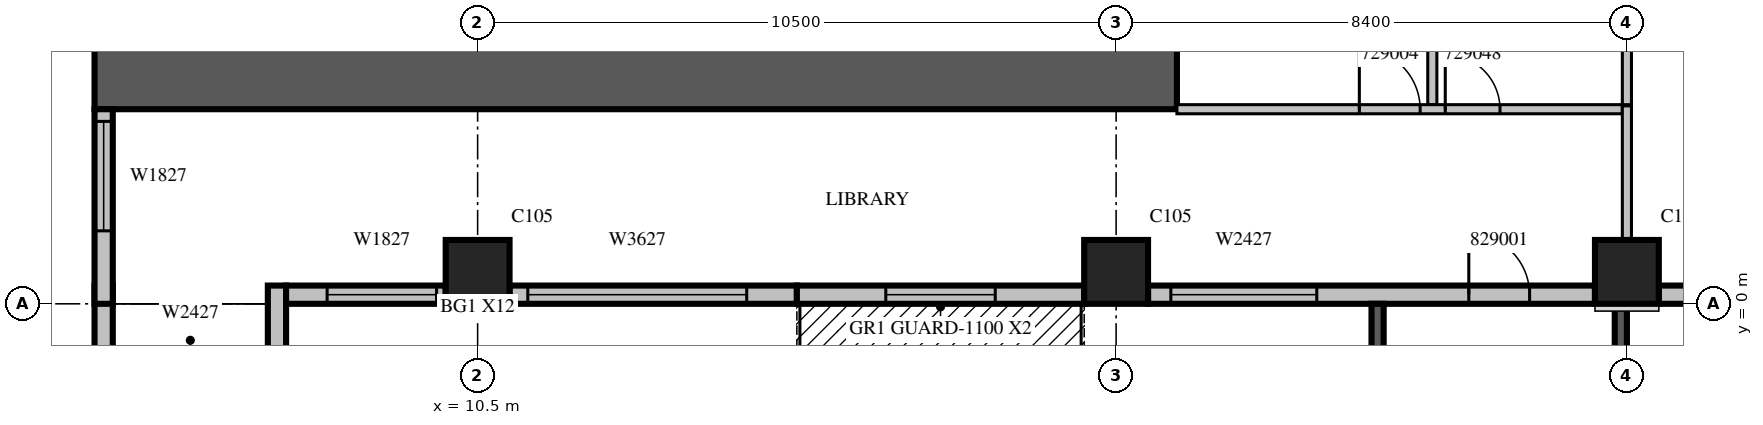
"""IFC4 building model, lengths in metres.
Left out: names, types, materials, properties, quantities, classifications, styles, units other than length and angle.
Written with IfcOpenShell. Run it as: python <this file> out.ifc"""

import sys

from ifc_helpers import new_model, si_unit, direction, frame, frame_2d, origin, origin_2d, place, context, subcontext, project, spatial, rectangle, extrude, source, transform, mapped, element, fill, save


model = new_model("IFC4")
c1 = context("Model", 3, precision=1e-05, world=origin(), true_north=direction((0.0, 1.0)))
c2 = subcontext(c1, "Body", "Model", "MODEL_VIEW")
j1 = project(units=[si_unit("LENGTHUNIT", "METRE"), si_unit("PLANEANGLEUNIT", "RADIAN")], contexts=[c1])
p1 = place(None, origin())
s1 = spatial("IfcSite", under=j1, at=p1, CompositionType="ELEMENT")
p2 = place(p1, origin())
s2 = spatial("IfcBuilding", under=s1, at=p2, CompositionType="ELEMENT")
p3 = place(p2, frame((0.0, 0.0, 132.9)))
s3 = spatial("IfcBuildingStorey", under=s2, at=p3, CompositionType="ELEMENT", Elevation=132.9)
m1 = source(origin(), c2, "Body", "SweptSolid", [
    extrude(rectangle(XDim=1.05, YDim=1.05, at=origin_2d()), origin(), (0.0, 0.0, 1.0), 4.2),
])
for number, where, z_axis, x_axis in (
    (1, (10.5, 0.525, 0.0), (0.0, 0.0, 1.0), (1.0, 0.0, 0.0)),
    (2, (21.0, 0.525, 0.0), (0.0, 0.0, 1.0), (1.0, 0.0, 0.0)),
    (3, (29.4, 0.525, 0.0), (0.0, 0.0, 1.0), (1.0, 0.0, 0.0)),
):
    element("IfcColumn", number, at=place(p3, frame(where, z_axis=z_axis, x_axis=x_axis)), inside=s3, PredefinedType="COLUMN", context=c2, shape_type="MappedRepresentation", body=[
        mapped(m1, transform((0.0, 0.0, 0.0), scale=1.0)),
    ])
m2 = source(origin(), c2, "Body", "SweptSolid", [
    extrude(rectangle(XDim=17.8, YDim=1.0, at=frame_2d((8.9, 0.0))), origin(), (0.0, 0.0, 1.0), 4.2),
])
p4 = place(p3, frame((4.2, 3.7, 0.0), z_axis=(0.0, 0.0, 1.0), x_axis=(1.0, 0.0, 0.0)))
e4 = element("IfcWall", 4, at=p4, inside=s3, PredefinedType="SHEAR", context=c2, shape_type="MappedRepresentation", body=[
    mapped(m2, transform((0.0, 0.0, 0.0), scale=1.0)),
])
m3 = source(origin(), c2, "Body", "SweptSolid", [
    extrude(rectangle(XDim=1.2, YDim=0.3, at=frame_2d((0.6, 0.0))), origin(), (0.0, 0.0, 1.0), 3.8),
])
for number, where, z_axis, x_axis in (
    (5, (4.35, 0.3, 0.0), (0.0, 0.0, 1.0), (0.0, -1.0, 0.0)),
    (6, (7.2, 0.3, 0.0), (0.0, 0.0, 1.0), (0.0, -1.0, 0.0)),
):
    element("IfcWall", number, at=place(p3, frame(where, z_axis=z_axis, x_axis=x_axis)), inside=s3, PredefinedType="STANDARD", context=c2, shape_type="MappedRepresentation", body=[
        mapped(m3, transform((0.0, 0.0, 0.0), scale=1.0)),
    ])
m4 = source(origin(), c2, "Body", "SweptSolid", [
    extrude(rectangle(XDim=2.625, YDim=0.3, at=frame_2d((1.312, 0.0))), origin(), (0.0, 0.0, 1.0), 3.8),
])
p5 = place(p3, frame((7.35, 0.15, 0.0), z_axis=(0.0, 0.0, 1.0), x_axis=(1.0, 0.0, 0.0)))
e7 = element("IfcWall", 7, at=p5, inside=s3, PredefinedType="STANDARD", context=c2, shape_type="MappedRepresentation", body=[
    mapped(m4, transform((0.0, 0.0, 0.0), scale=1.0)),
])
m5 = source(origin(), c2, "Body", "SweptSolid", [
    extrude(rectangle(XDim=1.8, YDim=2.7, at=frame_2d((0.9, 1.35))), frame((0.0, 0.16, 0.0), z_axis=(0.0, -1.0, 0.0), x_axis=(1.0, 0.0, 0.0)), (0.0, 0.0, 1.0), 0.32),
])
p6 = place(p5, frame((0.675, 0.0, 0.6)))
e8 = element("IfcOpeningElement", 8, at=p6, cuts=e7, PredefinedType="OPENING", context=c2, shape_type="MappedRepresentation", body=[
    mapped(m5, transform((0.0, 0.0, 0.0), scale=1.0)),
])
m6 = source(origin(), c2, "Body", "SweptSolid", [
    extrude(rectangle(XDim=4.725, YDim=0.3, at=frame_2d((2.362, 0.0))), origin(), (0.0, 0.0, 1.0), 3.8),
])
p7 = place(p3, frame((11.025, 0.15, 0.0), z_axis=(0.0, 0.0, 1.0), x_axis=(1.0, 0.0, 0.0)))
e9 = element("IfcWall", 9, at=p7, inside=s3, PredefinedType="STANDARD", context=c2, shape_type="MappedRepresentation", body=[
    mapped(m6, transform((0.0, 0.0, 0.0), scale=1.0)),
])
m7 = source(origin(), c2, "Body", "SweptSolid", [
    extrude(rectangle(XDim=3.6, YDim=2.7, at=frame_2d((1.8, 1.35))), frame((0.0, 0.16, 0.0), z_axis=(0.0, -1.0, 0.0), x_axis=(1.0, 0.0, 0.0)), (0.0, 0.0, 1.0), 0.32),
])
p8 = place(p7, frame((0.3, 0.0, 0.6)))
e10 = element("IfcOpeningElement", 10, at=p8, cuts=e9, PredefinedType="OPENING", context=c2, shape_type="MappedRepresentation", body=[
    mapped(m7, transform((0.0, 0.0, 0.0), scale=1.0)),
])
p9 = place(p3, frame((15.75, 0.15, 0.0), z_axis=(0.0, 0.0, 1.0), x_axis=(1.0, 0.0, 0.0)))
e11 = element("IfcWall", 11, at=p9, inside=s3, PredefinedType="STANDARD", context=c2, shape_type="MappedRepresentation", body=[
    mapped(m6, transform((0.0, 0.0, 0.0), scale=1.0)),
])
m8 = source(origin(), c2, "Body", "SweptSolid", [
    extrude(rectangle(XDim=1.8, YDim=2.4, at=frame_2d((0.9, 1.2))), frame((0.0, 0.16, 0.0), z_axis=(0.0, -1.0, 0.0), x_axis=(1.0, 0.0, 0.0)), (0.0, 0.0, 1.0), 0.32),
])
p10 = place(p9, frame((1.462, 0.0, 0.0)))
e12 = element("IfcOpeningElement", 12, at=p10, cuts=e11, PredefinedType="OPENING", context=c2, shape_type="MappedRepresentation", body=[
    mapped(m8, transform((0.0, 0.0, 0.0), scale=1.0)),
])
m9 = source(origin(), c2, "Body", "SweptSolid", [
    extrude(rectangle(XDim=7.35, YDim=0.3, at=frame_2d((3.675, 0.0))), origin(), (0.0, 0.0, 1.0), 3.8),
])
p11 = place(p3, frame((21.525, 0.15, 0.0), z_axis=(0.0, 0.0, 1.0), x_axis=(1.0, 0.0, 0.0)))
e13 = element("IfcWall", 13, at=p11, inside=s3, PredefinedType="STANDARD", context=c2, shape_type="MappedRepresentation", body=[
    mapped(m9, transform((0.0, 0.0, 0.0), scale=1.0)),
])
m10 = source(origin(), c2, "Body", "SweptSolid", [
    extrude(rectangle(XDim=2.4, YDim=2.7, at=frame_2d((1.2, 1.35))), frame((0.0, 0.16, 0.0), z_axis=(0.0, -1.0, 0.0), x_axis=(1.0, 0.0, 0.0)), (0.0, 0.0, 1.0), 0.32),
])
p12 = place(p11, frame((0.375, 0.0, 0.6)))
e14 = element("IfcOpeningElement", 14, at=p12, cuts=e13, PredefinedType="OPENING", context=c2, shape_type="MappedRepresentation", body=[
    mapped(m10, transform((0.0, 0.0, 0.0), scale=1.0)),
])
m11 = source(origin(), c2, "Body", "SweptSolid", [
    extrude(rectangle(XDim=1.0, YDim=2.1, at=frame_2d((0.5, 1.05))), frame((0.0, 0.16, 0.0), z_axis=(0.0, -1.0, 0.0), x_axis=(1.0, 0.0, 0.0)), (0.0, 0.0, 1.0), 0.32),
])
p13 = place(p11, frame((5.275, 0.0, 0.0)))
e15 = element("IfcOpeningElement", 15, at=p13, cuts=e13, PredefinedType="OPENING", context=c2, shape_type="MappedRepresentation", body=[
    mapped(m11, transform((0.0, 0.0, 0.0), scale=1.0)),
])
p14 = place(p3, frame((29.925, 0.15, 0.0), z_axis=(0.0, 0.0, 1.0), x_axis=(1.0, 0.0, 0.0)))
e16 = element("IfcWall", 16, at=p14, inside=s3, PredefinedType="STANDARD", context=c2, shape_type="MappedRepresentation", body=[
    mapped(m9, transform((0.0, 0.0, 0.0), scale=1.0)),
])
p15 = place(p14, frame((2.575, 0.0, 0.6)))
e17 = element("IfcOpeningElement", 17, at=p15, cuts=e16, PredefinedType="OPENING", context=c2, shape_type="MappedRepresentation", body=[
    mapped(m10, transform((0.0, 0.0, 0.0), scale=1.0)),
])
m12 = source(origin(), c2, "Body", "SweptSolid", [
    extrude(rectangle(XDim=3.2, YDim=0.3, at=frame_2d((1.6, 0.0))), origin(), (0.0, 0.0, 1.0), 3.8),
])
p16 = place(p3, frame((4.35, 3.2, 0.0), z_axis=(0.0, 0.0, 1.0), x_axis=(0.0, -1.0, 0.0)))
e18 = element("IfcWall", 18, at=p16, inside=s3, PredefinedType="STANDARD", context=c2, shape_type="MappedRepresentation", body=[
    mapped(m12, transform((0.0, 0.0, 0.0), scale=1.0)),
])
p17 = place(p16, frame((0.2, 0.0, 0.6)))
e19 = element("IfcOpeningElement", 19, at=p17, cuts=e18, PredefinedType="OPENING", context=c2, shape_type="MappedRepresentation", body=[
    mapped(m5, transform((0.0, 0.0, 0.0), scale=1.0)),
])
m13 = source(origin(), c2, "Body", "SweptSolid", [
    extrude(rectangle(XDim=3.9, YDim=0.2, at=frame_2d((1.95, 0.0))), origin(), (0.0, 0.0, 1.0), 3.79),
])
p18 = place(p3, frame((25.3, 0.0, 0.0), z_axis=(0.0, 0.0, 1.0), x_axis=(0.0, -1.0, 0.0)))
e20 = element("IfcWall", 20, at=p18, inside=s3, PredefinedType="SOLIDWALL", context=c2, shape_type="MappedRepresentation", body=[
    mapped(m13, transform((0.0, 0.0, 0.0), scale=1.0)),
])
m14 = source(origin(), c2, "Body", "SweptSolid", [
    extrude(rectangle(XDim=2.4, YDim=2.7, at=frame_2d((1.2, 1.35))), frame((0.0, 0.11, 0.0), z_axis=(0.0, -1.0, 0.0), x_axis=(1.0, 0.0, 0.0)), (0.0, 0.0, 1.0), 0.22),
])
p19 = place(p18, frame((0.75, 0.0, 0.6)))
e21 = element("IfcOpeningElement", 21, at=p19, cuts=e20, PredefinedType="OPENING", context=c2, shape_type="MappedRepresentation", body=[
    mapped(m14, transform((0.0, 0.0, 0.0), scale=1.0)),
])
p20 = place(p3, frame((29.3, 0.0, 0.0), z_axis=(0.0, 0.0, 1.0), x_axis=(0.0, -1.0, 0.0)))
e22 = element("IfcWall", 22, at=p20, inside=s3, PredefinedType="SOLIDWALL", context=c2, shape_type="MappedRepresentation", body=[
    mapped(m13, transform((0.0, 0.0, 0.0), scale=1.0)),
])
p21 = place(p20, frame((0.75, 0.0, 0.6)))
e23 = element("IfcOpeningElement", 23, at=p21, cuts=e22, PredefinedType="OPENING", context=c2, shape_type="MappedRepresentation", body=[
    mapped(m14, transform((0.0, 0.0, 0.0), scale=1.0)),
])
m15 = source(origin(), c2, "Body", "SweptSolid", [
    extrude(rectangle(XDim=11.425, YDim=0.15, at=frame_2d((5.713, 0.0))), origin(), (0.0, 0.0, 1.0), 3.8),
])
p22 = place(p3, frame((26.2, 14.7, 0.0), z_axis=(0.0, 0.0, 1.0), x_axis=(0.0, -1.0, 0.0)))
e24 = element("IfcWall", 24, at=p22, inside=s3, PredefinedType="PARTITIONING", context=c2, shape_type="MappedRepresentation", body=[
    mapped(m15, transform((0.0, 0.0, 0.0), scale=1.0)),
])
m16 = source(origin(), c2, "Body", "SweptSolid", [
    extrude(rectangle(XDim=0.9, YDim=2.1, at=frame_2d((0.45, 1.05))), frame((0.0, 0.085, 0.0), z_axis=(0.0, -1.0, 0.0), x_axis=(1.0, 0.0, 0.0)), (0.0, 0.0, 1.0), 0.17),
])
p23 = place(p22, frame((7.362, 0.0, 0.0)))
e25 = element("IfcOpeningElement", 25, at=p23, cuts=e24, PredefinedType="OPENING", context=c2, shape_type="MappedRepresentation", body=[
    mapped(m16, transform((0.0, 0.0, 0.0), scale=1.0)),
])
p24 = place(p22, frame((0.775, 0.0, 0.0)))
e26 = element("IfcOpeningElement", 26, at=p24, cuts=e24, PredefinedType="OPENING", context=c2, shape_type="MappedRepresentation", body=[
    mapped(m16, transform((0.0, 0.0, 0.0), scale=1.0)),
])
m17 = source(origin(), c2, "Body", "SweptSolid", [
    extrude(rectangle(XDim=6.701, YDim=0.15, at=frame_2d((3.35, 0.0))), origin(), (0.0, 0.0, 1.0), 3.8),
])
p25 = place(p3, frame((29.4, 3.275, 0.0), z_axis=(0.0, 0.0, 1.0), x_axis=(0.0, 1.0, 0.0)))
e27 = element("IfcWall", 27, at=p25, inside=s3, PredefinedType="PARTITIONING", context=c2, shape_type="MappedRepresentation", body=[
    mapped(m17, transform((0.0, 0.0, 0.0), scale=1.0)),
])
m18 = source(origin(), c2, "Body", "SweptSolid", [
    extrude(rectangle(XDim=7.325, YDim=0.15, at=frame_2d((3.663, 0.0))), origin(), (0.0, 0.0, 1.0), 3.8),
])
p26 = place(p3, frame((22.0, 3.2, 0.0), z_axis=(0.0, 0.0, 1.0), x_axis=(1.0, 0.0, 0.0)))
e28 = element("IfcWall", 28, at=p26, inside=s3, PredefinedType="PARTITIONING", context=c2, shape_type="MappedRepresentation", body=[
    mapped(m18, transform((0.0, 0.0, 0.0), scale=1.0)),
])
m19 = source(origin(), c2, "Body", "SweptSolid", [
    extrude(rectangle(XDim=1.0, YDim=2.1, at=frame_2d((0.5, 1.05))), frame((0.0, 0.085, 0.0), z_axis=(0.0, -1.0, 0.0), x_axis=(1.0, 0.0, 0.0)), (0.0, 0.0, 1.0), 0.17),
])
p27 = place(p26, frame((3.0, 0.0, 0.0)))
e29 = element("IfcOpeningElement", 29, at=p27, cuts=e28, PredefinedType="OPENING", context=c2, shape_type="MappedRepresentation", body=[
    mapped(m19, transform((0.0, 0.0, 0.0), scale=1.0)),
])
p28 = place(p26, frame((4.413, 0.0, 0.0)))
e30 = element("IfcOpeningElement", 30, at=p28, cuts=e28, PredefinedType="OPENING", context=c2, shape_type="MappedRepresentation", body=[
    mapped(m16, transform((0.0, 0.0, 0.0), scale=1.0)),
])
m20 = source(origin(), c2, "Body", "SweptSolid", [
    extrude(rectangle(XDim=2.206, YDim=0.15, at=frame_2d((1.103, 0.0))), origin(), (0.0, 0.0, 1.0), 3.8),
])
p29 = place(p3, frame((29.4, 1.049, 0.0), z_axis=(0.0, 0.0, 1.0), x_axis=(0.0, 1.0, 0.0)))
e31 = element("IfcWall", 31, at=p29, inside=s3, PredefinedType="PARTITIONING", context=c2, shape_type="MappedRepresentation", body=[
    mapped(m20, transform((0.0, 0.0, 0.0), scale=1.0)),
])
m21 = source(origin(), c2, "Body", "SweptSolid", [
    extrude(rectangle(XDim=1.8, YDim=2.7, at=frame_2d((0.9, 1.35))), frame((0.0, 0.03, 0.0), z_axis=(0.0, -1.0, 0.0), x_axis=(1.0, 0.0, 0.0)), (0.0, 0.0, 1.0), 0.06),
])
p30 = place(p6, origin())
e32 = element("IfcWindow", 32, at=p30, inside=s3, PartitioningType="SINGLE_PANEL", PredefinedType="WINDOW", context=c2, shape_type="MappedRepresentation", body=[
    mapped(m21, transform((0.0, 0.0, 0.0), scale=1.0)),
])
fill(e8, e32)
m22 = source(origin(), c2, "Body", "SweptSolid", [
    extrude(rectangle(XDim=3.6, YDim=2.7, at=frame_2d((1.8, 1.35))), frame((0.0, 0.03, 0.0), z_axis=(0.0, -1.0, 0.0), x_axis=(1.0, 0.0, 0.0)), (0.0, 0.0, 1.0), 0.06),
])
p31 = place(p8, origin())
e33 = element("IfcWindow", 33, at=p31, inside=s3, PartitioningType="SINGLE_PANEL", PredefinedType="WINDOW", context=c2, shape_type="MappedRepresentation", body=[
    mapped(m22, transform((0.0, 0.0, 0.0), scale=1.0)),
])
fill(e10, e33)
m23 = source(origin(), c2, "Body", "SweptSolid", [
    extrude(rectangle(XDim=1.8, YDim=2.4, at=frame_2d((0.9, 1.2))), frame((0.0, 0.025, 0.0), z_axis=(0.0, -1.0, 0.0), x_axis=(1.0, 0.0, 0.0)), (0.0, 0.0, 1.0), 0.05),
])
p32 = place(p10, origin())
e34 = element("IfcDoor", 34, at=p32, inside=s3, OperationType="SLIDING_TO_LEFT", PredefinedType="DOOR", context=c2, shape_type="MappedRepresentation", body=[
    mapped(m23, transform((0.0, 0.0, 0.0), scale=1.0)),
])
fill(e12, e34)
m24 = source(origin(), c2, "Body", "SweptSolid", [
    extrude(rectangle(XDim=2.4, YDim=2.7, at=frame_2d((1.2, 1.35))), frame((0.0, 0.03, 0.0), z_axis=(0.0, -1.0, 0.0), x_axis=(1.0, 0.0, 0.0)), (0.0, 0.0, 1.0), 0.06),
])
p33 = place(p12, origin())
e35 = element("IfcWindow", 35, at=p33, inside=s3, PartitioningType="SINGLE_PANEL", PredefinedType="WINDOW", context=c2, shape_type="MappedRepresentation", body=[
    mapped(m24, transform((0.0, 0.0, 0.0), scale=1.0)),
])
fill(e14, e35)
p34 = place(p17, origin())
e36 = element("IfcWindow", 36, at=p34, inside=s3, PartitioningType="SINGLE_PANEL", PredefinedType="WINDOW", context=c2, shape_type="MappedRepresentation", body=[
    mapped(m21, transform((0.0, 0.0, 0.0), scale=1.0)),
])
fill(e19, e36)
m25 = source(origin(), c2, "Body", "SweptSolid", [
    extrude(rectangle(XDim=1.0, YDim=2.1, at=frame_2d((0.5, 1.05))), frame((0.0, 0.025, 0.0), z_axis=(0.0, -1.0, 0.0), x_axis=(1.0, 0.0, 0.0)), (0.0, 0.0, 1.0), 0.05),
])
p35 = place(p27, origin())
e37 = element("IfcDoor", 37, at=p35, inside=s3, OperationType="SINGLE_SWING_LEFT", PredefinedType="DOOR", context=c2, shape_type="MappedRepresentation", body=[
    mapped(m25, transform((0.0, 0.0, 0.0), scale=1.0)),
])
fill(e29, e37)
m26 = source(origin(), c2, "Body", "SweptSolid", [
    extrude(rectangle(XDim=0.9, YDim=2.1, at=frame_2d((0.45, 1.05))), frame((0.0, 0.025, 0.0), z_axis=(0.0, -1.0, 0.0), x_axis=(1.0, 0.0, 0.0)), (0.0, 0.0, 1.0), 0.05),
])
p36 = place(p28, origin())
e38 = element("IfcDoor", 38, at=p36, inside=s3, OperationType="SINGLE_SWING_LEFT", PredefinedType="DOOR", context=c2, shape_type="MappedRepresentation", body=[
    mapped(m26, transform((0.0, 0.0, 0.0), scale=1.0)),
])
fill(e30, e38)
p37 = place(p13, origin())
e39 = element("IfcDoor", 39, at=p37, inside=s3, OperationType="SINGLE_SWING_LEFT", PredefinedType="DOOR", context=c2, shape_type="MappedRepresentation", body=[
    mapped(m25, transform((0.0, 0.0, 0.0), scale=1.0)),
])
fill(e15, e39)
save(model, sys.argv[1])
